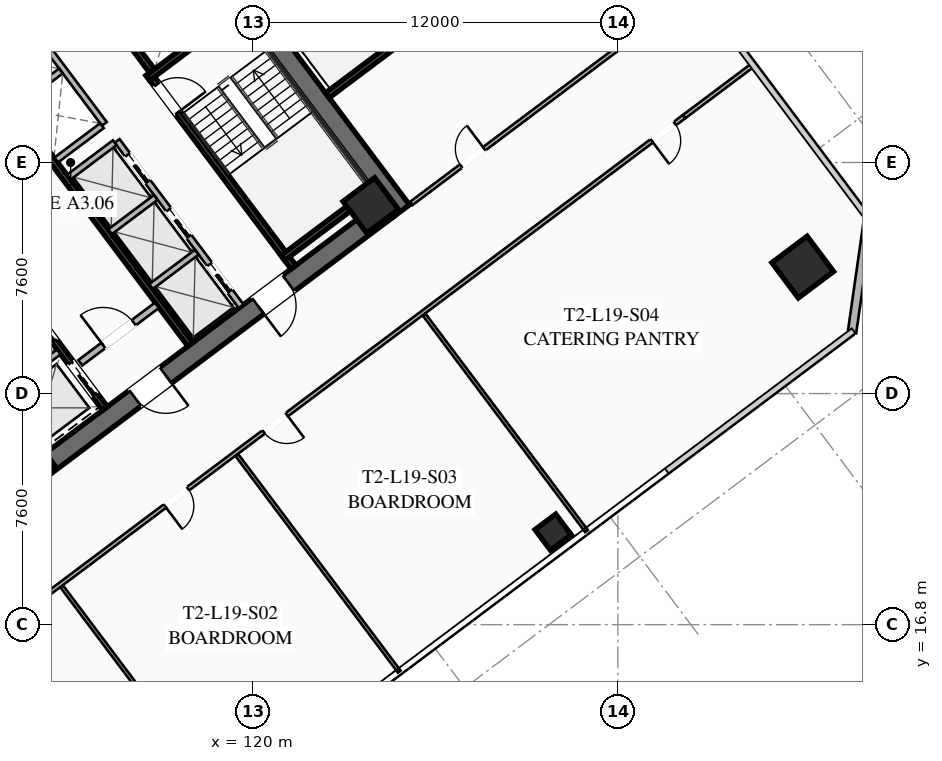
"""IFC4 building model, lengths in metres.
Left out: names, types, materials, properties, quantities, classifications, styles, units other than length and angle.
Written with IfcOpenShell. Run it as: python <this file> out.ifc"""

import sys

from ifc_helpers import new_model, si_unit, direction, frame, frame_2d, origin, origin_2d, place, context, subcontext, project, spatial, rectangle, hollow_rectangle, extrude, element, fill, save


model = new_model("IFC4")
c1 = context("Model", 3, precision=1e-05, world=origin(), true_north=direction((0.0, 1.0)))
c2 = subcontext(c1, "Body", "Model", "MODEL_VIEW")
j1 = project(units=[si_unit("LENGTHUNIT", "METRE"), si_unit("PLANEANGLEUNIT", "RADIAN")], contexts=[c1])
p1 = place(None, origin())
s1 = spatial("IfcSite", under=j1, at=p1, CompositionType="ELEMENT")
p2 = place(p1, origin())
s2 = spatial("IfcBuilding", under=s1, at=p2, CompositionType="ELEMENT")
p3 = place(p2, frame((0.0, 0.0, 74.3)))
s3 = spatial("IfcBuildingStorey", under=s2, at=p3, CompositionType="ELEMENT", Elevation=74.3)
p4 = place(p3, frame((115.524, 42.893, 0.0), z_axis=(0.0, 0.0, 1.0), x_axis=(0.600005007985, -0.799996243986, 0.0)))
e1 = element("IfcWall", 1, at=p4, inside=s3, PredefinedType="SHEAR", context=c2, shape_type="SweptSolid", body=[
    extrude(rectangle(XDim=15.6, YDim=0.65, at=frame_2d((7.8, 0.0))), origin(), (0.0, 0.0, 1.0), 3.55),
])
p5 = place(p3, frame((124.429, 30.478, 0.0), z_axis=(0.0, 0.0, 1.0), x_axis=(-0.799998028465, -0.600002628705, 0.0)))
e2 = element("IfcWall", 2, at=p5, inside=s3, PredefinedType="SHEAR", context=c2, shape_type="SweptSolid", body=[
    extrude(rectangle(XDim=14.86, YDim=0.65, at=frame_2d((7.43, 0.0))), origin(), (0.0, 0.0, 1.0), 3.55),
])
p6 = place(p5, frame((9.13, 0.0, 0.0)))
e3 = element("IfcOpeningElement", 3, at=p6, cuts=e2, PredefinedType="OPENING", context=c2, shape_type="SweptSolid", body=[
    extrude(rectangle(XDim=1.25, YDim=2.25, at=frame_2d((0.625, 1.125))), frame((0.0, 0.335, 0.0), z_axis=(0.0, -1.0, 0.0), x_axis=(1.0, 0.0, 0.0)), (0.0, 0.0, 1.0), 0.67),
])
p7 = place(p5, frame((4.08, 0.0, 0.0)))
e4 = element("IfcOpeningElement", 4, at=p7, cuts=e2, PredefinedType="OPENING", context=c2, shape_type="SweptSolid", body=[
    extrude(rectangle(XDim=1.25, YDim=2.25, at=frame_2d((0.625, 1.125))), frame((0.0, 0.335, 0.0), z_axis=(0.0, -1.0, 0.0), x_axis=(1.0, 0.0, 0.0)), (0.0, 0.0, 1.0), 0.67),
])
p8 = place(p3, frame((103.571, 33.522, 0.0), z_axis=(0.0, 0.0, 1.0), x_axis=(0.799998028465, 0.600002628705, 0.0)))
e5 = element("IfcWall", 5, at=p8, inside=s3, PredefinedType="SHEAR", context=c2, shape_type="SweptSolid", body=[
    extrude(rectangle(XDim=14.86, YDim=0.65, at=frame_2d((7.43, 0.0))), origin(), (0.0, 0.0, 1.0), 3.55),
])
p9 = place(p8, frame((4.48, 0.0, 0.0)))
e6 = element("IfcOpeningElement", 6, at=p9, cuts=e5, PredefinedType="OPENING", context=c2, shape_type="SweptSolid", body=[
    extrude(rectangle(XDim=1.25, YDim=2.25, at=frame_2d((0.625, 1.125))), frame((0.0, 0.335, 0.0), z_axis=(0.0, -1.0, 0.0), x_axis=(1.0, 0.0, 0.0)), (0.0, 0.0, 1.0), 0.67),
])
p10 = place(p8, frame((9.53, 0.0, 0.0)))
e7 = element("IfcOpeningElement", 7, at=p10, cuts=e5, PredefinedType="OPENING", context=c2, shape_type="SweptSolid", body=[
    extrude(rectangle(XDim=1.25, YDim=2.25, at=frame_2d((0.625, 1.125))), frame((0.0, 0.335, 0.0), z_axis=(0.0, -1.0, 0.0), x_axis=(1.0, 0.0, 0.0)), (0.0, 0.0, 1.0), 0.67),
])
for number, where, z_axis, x_axis in (
    (8, (112.59, 22.13, 0.0), (0.0, 0.0, 1.0), (0.8, 0.6, 0.0)),
    (9, (123.87, 30.59, 0.0), (0.0, 0.0, 1.0), (0.8, 0.6, 0.0)),
):
    element("IfcColumn", number, at=place(p3, frame(where, z_axis=z_axis, x_axis=x_axis)), inside=s3, PredefinedType="COLUMN", context=c2, shape_type="SweptSolid", body=[
        extrude(hollow_rectangle(XDim=1.3, YDim=1.3, WallThickness=0.05, at=origin_2d()), origin(), (0.0, 0.0, 1.0), 3.35),
    ])
p11 = place(p3, frame((138.08, 28.56, 0.0), z_axis=(0.0, 0.0, 1.0), x_axis=(0.799999996291, 0.600000004945, 0.0)))
e10 = element("IfcColumn", 10, at=p11, inside=s3, PredefinedType="COLUMN", context=c2, shape_type="SweptSolid", body=[
    extrude(hollow_rectangle(XDim=1.45, YDim=1.45, WallThickness=0.055, at=origin_2d()), origin(), (0.0, 0.0, 1.0), 3.35),
])
p12 = place(p3, frame((129.87, 19.84, 0.0), z_axis=(0.0, 0.0, 1.0), x_axis=(0.799999996291, 0.600000004945, 0.0)))
e11 = element("IfcColumn", 11, at=p12, inside=s3, PredefinedType="COLUMN", context=c2, shape_type="SweptSolid", body=[
    extrude(hollow_rectangle(XDim=0.85, YDim=0.85, WallThickness=0.035, at=origin_2d()), origin(), (0.0, 0.0, 1.0), 3.35),
])
p13 = place(p3, frame((140.24, 30.18, 0.0), z_axis=(0.0, 0.0, 1.0), x_axis=(-0.141430307517, -0.989948214866, 0.0)))
e12 = element("IfcWall", 12, at=p13, inside=s3, PredefinedType="SOLIDWALL", context=c2, shape_type="SweptSolid", body=[
    extrude(rectangle(XDim=3.818, YDim=0.28, at=frame_2d((1.909, 0.0))), origin(), (0.0, 0.0, 1.0), 3.35),
])
p14 = place(p3, frame((116.56, 34.92, 0.0), z_axis=(0.0, 0.0, 1.0), x_axis=(0.600009827119, -0.799992629566, 0.0)))
e13 = element("IfcWall", 13, at=p14, inside=s3, PredefinedType="SHEAR", context=c2, shape_type="SweptSolid", body=[
    extrude(rectangle(XDim=7.95, YDim=0.2, at=frame_2d((3.975, 0.0))), origin(), (0.0, 0.0, 1.0), 3.35),
])
p15 = place(p14, frame((0.45, 0.0, 0.0)))
e14 = element("IfcOpeningElement", 14, at=p15, cuts=e13, PredefinedType="OPENING", context=c2, shape_type="SweptSolid", body=[
    extrude(rectangle(XDim=1.15, YDim=2.2, at=frame_2d((0.575, 1.1))), frame((0.0, 0.11, 0.0), z_axis=(0.0, -1.0, 0.0), x_axis=(1.0, 0.0, 0.0)), (0.0, 0.0, 1.0), 0.22),
])
for number, where, z_axis, x_axis in (
    (15, (116.54, 34.78, 0.0), (0.0, 0.0, 1.0), (0.8, 0.6, 0.0)),
    (16, (120.98, 28.86, 0.0), (0.0, 0.0, 1.0), (0.8, 0.6, 0.0)),
):
    element("IfcWall", number, at=place(p3, frame(where, z_axis=z_axis, x_axis=x_axis)), inside=s3, PredefinedType="SHEAR", context=c2, shape_type="SweptSolid", body=[
        extrude(rectangle(XDim=3.73, YDim=0.2, at=frame_2d((1.865, 0.0))), origin(), (0.0, 0.0, 1.0), 3.35),
    ])
p16 = place(p3, frame((117.938, 26.016, 0.0), z_axis=(0.0, 0.0, 1.0), x_axis=(-0.600005463273, 0.799995902516, 0.0)))
e17 = element("IfcWall", 17, at=p16, inside=s3, PredefinedType="SHEAR", context=c2, shape_type="SweptSolid", body=[
    extrude(rectangle(XDim=14.3, YDim=0.2, at=frame_2d((7.15, 0.0))), origin(), (0.0, 0.0, 1.0), 3.35),
])
p17 = place(p3, frame((114.316, 25.412, 0.0), z_axis=(0.0, 0.0, 1.0), x_axis=(0.800018601094, 0.59997519774, 0.0)))
e18 = element("IfcWall", 18, at=p17, inside=s3, PredefinedType="SOLIDWALL", context=c2, shape_type="SweptSolid", body=[
    extrude(rectangle(XDim=3.15, YDim=0.22, at=frame_2d((1.575, 0.0))), origin(), (0.0, 0.0, 1.0), 2.703),
])
p18 = place(p17, frame((0.95, 0.0, 0.0)))
e19 = element("IfcOpeningElement", 19, at=p18, cuts=e18, PredefinedType="OPENING", context=c2, shape_type="SweptSolid", body=[
    extrude(rectangle(XDim=1.25, YDim=2.25, at=frame_2d((0.625, 1.125))), frame((0.0, 0.12, 0.0), z_axis=(0.0, -1.0, 0.0), x_axis=(1.0, 0.0, 0.0)), (0.0, 0.0, 1.0), 0.24),
])
p19 = place(p3, frame((115.13, 23.91, 0.0), z_axis=(0.0, 0.0, 1.0), x_axis=(-0.599975393228, 0.800018454488, 0.0)))
e20 = element("IfcWall", 20, at=p19, inside=s3, PredefinedType="SHEAR", context=c2, shape_type="SweptSolid", body=[
    extrude(rectangle(XDim=6.35, YDim=0.2, at=frame_2d((3.175, 0.0))), origin(), (0.0, 0.0, 1.0), 3.35),
])
p20 = place(p19, frame((4.775, 0.0, 0.0)))
e21 = element("IfcOpeningElement", 21, at=p20, cuts=e20, PredefinedType="OPENING", context=c2, shape_type="SweptSolid", body=[
    extrude(rectangle(XDim=1.3, YDim=2.25, at=frame_2d((0.65, 1.125))), frame((0.0, 0.11, 0.0), z_axis=(0.0, -1.0, 0.0), x_axis=(1.0, 0.0, 0.0)), (0.0, 0.0, 1.0), 0.22),
])
p21 = place(p19, frame((2.775, 0.0, 0.0)))
e22 = element("IfcOpeningElement", 22, at=p21, cuts=e20, PredefinedType="OPENING", context=c2, shape_type="SweptSolid", body=[
    extrude(rectangle(XDim=1.3, YDim=2.25, at=frame_2d((0.65, 1.125))), frame((0.0, 0.11, 0.0), z_axis=(0.0, -1.0, 0.0), x_axis=(1.0, 0.0, 0.0)), (0.0, 0.0, 1.0), 0.22),
])
p22 = place(p19, frame((0.575, 0.0, 0.0)))
e23 = element("IfcOpeningElement", 23, at=p22, cuts=e20, PredefinedType="OPENING", context=c2, shape_type="SweptSolid", body=[
    extrude(rectangle(XDim=1.3, YDim=2.25, at=frame_2d((0.65, 1.125))), frame((0.0, 0.11, 0.0), z_axis=(0.0, -1.0, 0.0), x_axis=(1.0, 0.0, 0.0)), (0.0, 0.0, 1.0), 0.22),
])
p23 = place(p3, frame((110.906, 23.742, 0.0), z_axis=(0.0, 0.0, 1.0), x_axis=(0.8, 0.6, 0.0)))
e24 = element("IfcWall", 24, at=p23, inside=s3, PredefinedType="SOLIDWALL", context=c2, shape_type="SweptSolid", body=[
    extrude(rectangle(XDim=3.38, YDim=0.2, at=frame_2d((1.69, 0.0))), origin(), (0.0, 0.0, 1.0), 3.35),
])
p24 = place(p3, frame((112.87, 40.09, 0.0), z_axis=(0.0, 0.0, 1.0), x_axis=(0.599975393228, -0.800018454488, 0.0)))
e25 = element("IfcWall", 25, at=p24, inside=s3, PredefinedType="SHEAR", context=c2, shape_type="SweptSolid", body=[
    extrude(rectangle(XDim=6.35, YDim=0.2, at=frame_2d((3.175, 0.0))), origin(), (0.0, 0.0, 1.0), 3.35),
])
p25 = place(p3, frame((119.61, 27.27, 0.0), z_axis=(0.0, 0.0, 1.0), x_axis=(-0.600011488909, 0.79999138319, 0.0)))
e26 = element("IfcWall", 26, at=p25, inside=s3, PredefinedType="SOLIDWALL", context=c2, shape_type="SweptSolid", body=[
    extrude(rectangle(XDim=6.8, YDim=0.2, at=frame_2d((3.4, 0.0))), origin(), (0.0, 0.0, 1.0), 3.35),
])
p26 = place(p25, frame((0.625, 0.0, 0.0)))
e27 = element("IfcOpeningElement", 27, at=p26, cuts=e26, PredefinedType="OPENING", context=c2, shape_type="SweptSolid", body=[
    extrude(rectangle(XDim=1.1, YDim=2.2, at=frame_2d((0.55, 1.1))), frame((0.0, 0.11, 0.0), z_axis=(0.0, -1.0, 0.0), x_axis=(1.0, 0.0, 0.0)), (0.0, 0.0, 1.0), 0.22),
])
p27 = place(p25, frame((2.875, 0.0, 0.0)))
e28 = element("IfcOpeningElement", 28, at=p27, cuts=e26, PredefinedType="OPENING", context=c2, shape_type="SweptSolid", body=[
    extrude(rectangle(XDim=1.1, YDim=2.2, at=frame_2d((0.55, 1.1))), frame((0.0, 0.11, 0.0), z_axis=(0.0, -1.0, 0.0), x_axis=(1.0, 0.0, 0.0)), (0.0, 0.0, 1.0), 0.22),
])
p28 = place(p25, frame((5.125, 0.0, 0.0)))
e29 = element("IfcOpeningElement", 29, at=p28, cuts=e26, PredefinedType="OPENING", context=c2, shape_type="SweptSolid", body=[
    extrude(rectangle(XDim=1.1, YDim=2.2, at=frame_2d((0.55, 1.1))), frame((0.0, 0.11, 0.0), z_axis=(0.0, -1.0, 0.0), x_axis=(1.0, 0.0, 0.0)), (0.0, 0.0, 1.0), 0.22),
])
p29 = place(p3, frame((116.646, 27.922, 0.0), z_axis=(0.0, 0.0, 1.0), x_axis=(0.8, 0.6, 0.0)))
e30 = element("IfcWall", 30, at=p29, inside=s3, PredefinedType="SOLIDWALL", context=c2, shape_type="SweptSolid", body=[
    extrude(rectangle(XDim=1.88, YDim=0.2, at=frame_2d((0.94, 0.0))), origin(), (0.0, 0.0, 1.0), 3.35),
])
p30 = place(p3, frame((115.296, 29.722, 0.0), z_axis=(0.0, 0.0, 1.0), x_axis=(0.799984418148, 0.600020775241, 0.0)))
e31 = element("IfcWall", 31, at=p30, inside=s3, PredefinedType="SOLIDWALL", context=c2, shape_type="SweptSolid", body=[
    extrude(rectangle(XDim=1.88, YDim=0.2, at=frame_2d((0.94, 0.0))), origin(), (0.0, 0.0, 1.0), 3.35),
])
p31 = place(p3, frame((113.946, 31.522, 0.0), z_axis=(0.0, 0.0, 1.0), x_axis=(0.8, 0.6, 0.0)))
e32 = element("IfcWall", 32, at=p31, inside=s3, PredefinedType="SOLIDWALL", context=c2, shape_type="SweptSolid", body=[
    extrude(rectangle(XDim=1.88, YDim=0.2, at=frame_2d((0.94, 0.0))), origin(), (0.0, 0.0, 1.0), 3.35),
])
p32 = place(p3, frame((115.11, 33.27, 0.0), z_axis=(0.0, 0.0, 1.0), x_axis=(-0.600011488909, 0.79999138319, 0.0)))
e33 = element("IfcWall", 33, at=p32, inside=s3, PredefinedType="SOLIDWALL", context=c2, shape_type="SweptSolid", body=[
    extrude(rectangle(XDim=6.8, YDim=0.2, at=frame_2d((3.4, 0.0))), origin(), (0.0, 0.0, 1.0), 3.35),
])
p33 = place(p3, frame((113.526, 32.082, 0.0), z_axis=(0.0, 0.0, 1.0), x_axis=(0.800046745961, 0.599937666993, 0.0)))
e34 = element("IfcWall", 34, at=p33, inside=s3, PredefinedType="SOLIDWALL", context=c2, shape_type="SweptSolid", body=[
    extrude(rectangle(XDim=1.88, YDim=0.2, at=frame_2d((0.94, 0.0))), origin(), (0.0, 0.0, 1.0), 3.35),
])
p34 = place(p3, frame((112.176, 33.882, 0.0), z_axis=(0.0, 0.0, 1.0), x_axis=(0.8, 0.6, 0.0)))
e35 = element("IfcWall", 35, at=p34, inside=s3, PredefinedType="SOLIDWALL", context=c2, shape_type="SweptSolid", body=[
    extrude(rectangle(XDim=1.88, YDim=0.2, at=frame_2d((0.94, 0.0))), origin(), (0.0, 0.0, 1.0), 3.35),
])
p35 = place(p3, frame((122.444, 34.208, 0.0), z_axis=(0.0, 0.0, 1.0), x_axis=(0.79999138319, 0.600011488909, 0.0)))
e36 = element("IfcWall", 36, at=p35, inside=s3, PredefinedType="SHEAR", context=c2, shape_type="SweptSolid", body=[
    extrude(rectangle(XDim=3.4, YDim=0.2, at=frame_2d((1.7, 0.0))), origin(), (0.0, 0.0, 1.0), 3.35),
])
p36 = place(p3, frame((98.516, 34.012, 0.0), z_axis=(0.0, 0.0, 1.0), x_axis=(0.8, 0.6, 0.0)))
e37 = element("IfcWall", 37, at=p36, inside=s3, PredefinedType="PARTITIONING", context=c2, shape_type="SweptSolid", body=[
    extrude(rectangle(XDim=28.23, YDim=0.135, at=frame_2d((14.115, 0.0))), origin(), (0.0, 0.0, 1.0), 2.703),
])
p37 = place(p36, frame((0.3, 0.0, 0.0)))
e38 = element("IfcOpeningElement", 38, at=p37, cuts=e37, PredefinedType="OPENING", context=c2, shape_type="SweptSolid", body=[
    extrude(rectangle(XDim=0.95, YDim=2.05, at=frame_2d((0.475, 1.025))), frame((0.0, 0.077, 0.0), z_axis=(0.0, -1.0, 0.0), x_axis=(1.0, 0.0, 0.0)), (0.0, 0.0, 1.0), 0.155),
])
p38 = place(p36, frame((6.84, 0.0, 0.0)))
e39 = element("IfcOpeningElement", 39, at=p38, cuts=e37, PredefinedType="OPENING", context=c2, shape_type="SweptSolid", body=[
    extrude(rectangle(XDim=0.95, YDim=2.05, at=frame_2d((0.475, 1.025))), frame((0.0, 0.077, 0.0), z_axis=(0.0, -1.0, 0.0), x_axis=(1.0, 0.0, 0.0)), (0.0, 0.0, 1.0), 0.155),
])
p39 = place(p36, frame((10.863, 0.0, 0.0)))
e40 = element("IfcOpeningElement", 40, at=p39, cuts=e37, PredefinedType="OPENING", context=c2, shape_type="SweptSolid", body=[
    extrude(rectangle(XDim=0.95, YDim=2.05, at=frame_2d((0.475, 1.025))), frame((0.0, 0.077, 0.0), z_axis=(0.0, -1.0, 0.0), x_axis=(1.0, 0.0, 0.0)), (0.0, 0.0, 1.0), 0.155),
])
p40 = place(p36, frame((26.98, 0.0, 0.0)))
e41 = element("IfcOpeningElement", 41, at=p40, cuts=e37, PredefinedType="OPENING", context=c2, shape_type="SweptSolid", body=[
    extrude(rectangle(XDim=0.95, YDim=2.05, at=frame_2d((0.475, 1.025))), frame((0.0, 0.077, 0.0), z_axis=(0.0, -1.0, 0.0), x_axis=(1.0, 0.0, 0.0)), (0.0, 0.0, 1.0), 0.155),
])
p41 = place(p3, frame((134.18, 33.51, 0.0), z_axis=(0.0, 0.0, 1.0), x_axis=(-0.8, -0.6, 0.0)))
e42 = element("IfcWall", 42, at=p41, inside=s3, PredefinedType="PARTITIONING", context=c2, shape_type="SweptSolid", body=[
    extrude(rectangle(XDim=28.23, YDim=0.135, at=frame_2d((14.115, 0.0))), origin(), (0.0, 0.0, 1.0), 2.703),
])
p42 = place(p41, frame((26.9, 0.0, 0.0)))
e43 = element("IfcOpeningElement", 43, at=p42, cuts=e42, PredefinedType="OPENING", context=c2, shape_type="SweptSolid", body=[
    extrude(rectangle(XDim=0.95, YDim=2.05, at=frame_2d((0.475, 1.025))), frame((0.0, 0.077, 0.0), z_axis=(0.0, -1.0, 0.0), x_axis=(1.0, 0.0, 0.0)), (0.0, 0.0, 1.0), 0.155),
])
p43 = place(p41, frame((20.399, 0.0, 0.0)))
e44 = element("IfcOpeningElement", 44, at=p43, cuts=e42, PredefinedType="OPENING", context=c2, shape_type="SweptSolid", body=[
    extrude(rectangle(XDim=0.95, YDim=2.05, at=frame_2d((0.475, 1.025))), frame((0.0, 0.077, 0.0), z_axis=(0.0, -1.0, 0.0), x_axis=(1.0, 0.0, 0.0)), (0.0, 0.0, 1.0), 0.155),
])
p44 = place(p41, frame((16.339, 0.0, 0.0)))
e45 = element("IfcOpeningElement", 45, at=p44, cuts=e42, PredefinedType="OPENING", context=c2, shape_type="SweptSolid", body=[
    extrude(rectangle(XDim=0.95, YDim=2.05, at=frame_2d((0.475, 1.025))), frame((0.0, 0.077, 0.0), z_axis=(0.0, -1.0, 0.0), x_axis=(1.0, 0.0, 0.0)), (0.0, 0.0, 1.0), 0.155),
])
p45 = place(p41, frame((0.38, 0.0, 0.0)))
e46 = element("IfcOpeningElement", 46, at=p45, cuts=e42, PredefinedType="OPENING", context=c2, shape_type="SweptSolid", body=[
    extrude(rectangle(XDim=0.95, YDim=2.05, at=frame_2d((0.475, 1.025))), frame((0.0, 0.077, 0.0), z_axis=(0.0, -1.0, 0.0), x_axis=(1.0, 0.0, 0.0)), (0.0, 0.0, 1.0), 0.155),
])
p46 = place(p3, frame((134.18, 33.51, 0.0), z_axis=(0.0, 0.0, 1.0), x_axis=(0.8000207031, 0.599972394874, 0.0)))
e47 = element("IfcWall", 47, at=p46, inside=s3, PredefinedType="PARTITIONING", context=c2, shape_type="SweptSolid", body=[
    extrude(rectangle(XDim=2.83, YDim=0.135, at=frame_2d((1.415, 0.0))), origin(), (0.0, 0.0, 1.0), 2.703),
])
for number, where, z_axis, x_axis in (
    (48, (119.048, 10.936, 0.0), (0.0, 0.0, 1.0), (-0.6, 0.8, 0.0)),
    (49, (124.808, 15.256, 0.0), (0.0, 0.0, 1.0), (-0.6, 0.8, 0.0)),
):
    element("IfcWall", number, at=place(p3, frame(where, z_axis=z_axis, x_axis=x_axis)), inside=s3, PredefinedType="PARTITIONING", context=c2, shape_type="SweptSolid", body=[
        extrude(rectangle(XDim=8.9, YDim=0.11, at=frame_2d((4.45, 0.0))), origin(), (0.0, 0.0, 1.0), 2.703),
    ])
p47 = place(p3, frame((130.968, 19.876, 0.0), z_axis=(0.0, 0.0, 1.0), x_axis=(-0.6, 0.8, 0.0)))
e50 = element("IfcWall", 50, at=p47, inside=s3, PredefinedType="PARTITIONING", context=c2, shape_type="SweptSolid", body=[
    extrude(rectangle(XDim=8.9, YDim=0.11, at=frame_2d((4.45, 0.0))), origin(), (0.0, 0.0, 1.0), 2.703),
])
p48 = place(p3, frame((125.208, 30.656, 0.0), z_axis=(0.0, 0.0, 1.0), x_axis=(0.8, 0.6, 0.0)))
e51 = element("IfcWall", 51, at=p48, inside=s3, PredefinedType="PARTITIONING", context=c2, shape_type="SweptSolid", body=[
    extrude(rectangle(XDim=11.72, YDim=0.135, at=frame_2d((5.86, 0.0))), origin(), (0.0, 0.0, 1.0), 2.703),
])
p49 = place(p48, frame((2.045, 0.0, 0.0)))
e52 = element("IfcOpeningElement", 52, at=p49, cuts=e51, PredefinedType="OPENING", context=c2, shape_type="SweptSolid", body=[
    extrude(rectangle(XDim=0.95, YDim=2.05, at=frame_2d((0.475, 1.025))), frame((0.0, 0.077, 0.0), z_axis=(0.0, -1.0, 0.0), x_axis=(1.0, 0.0, 0.0)), (0.0, 0.0, 1.0), 0.155),
])
p50 = place(p6, origin())
e53 = element("IfcDoor", 53, at=p50, inside=s3, OperationType="SINGLE_SWING_LEFT", PredefinedType="DOOR", context=c2, shape_type="SweptSolid", body=[
    extrude(rectangle(XDim=1.25, YDim=2.25, at=frame_2d((0.625, 1.125))), frame((0.0, 0.025, 0.0), z_axis=(0.0, -1.0, 0.0), x_axis=(1.0, 0.0, 0.0)), (0.0, 0.0, 1.0), 0.05),
])
fill(e3, e53)
p51 = place(p7, origin())
e54 = element("IfcDoor", 54, at=p51, inside=s3, OperationType="SINGLE_SWING_RIGHT", PredefinedType="DOOR", context=c2, shape_type="SweptSolid", body=[
    extrude(rectangle(XDim=1.25, YDim=2.25, at=frame_2d((0.625, 1.125))), frame((0.0, 0.025, 0.0), z_axis=(0.0, -1.0, 0.0), x_axis=(1.0, 0.0, 0.0)), (0.0, 0.0, 1.0), 0.05),
])
fill(e4, e54)
p52 = place(p15, origin())
e55 = element("IfcDoor", 55, at=p52, inside=s3, OperationType="SINGLE_SWING_RIGHT", PredefinedType="DOOR", context=c2, shape_type="SweptSolid", body=[
    extrude(rectangle(XDim=1.15, YDim=2.2, at=frame_2d((0.575, 1.1))), frame((0.0, 0.025, 0.0), z_axis=(0.0, -1.0, 0.0), x_axis=(1.0, 0.0, 0.0)), (0.0, 0.0, 1.0), 0.05),
])
fill(e14, e55)
p53 = place(p18, origin())
e56 = element("IfcDoor", 56, at=p53, inside=s3, OperationType="SINGLE_SWING_LEFT", PredefinedType="DOOR", context=c2, shape_type="SweptSolid", body=[
    extrude(rectangle(XDim=1.25, YDim=2.25, at=frame_2d((0.625, 1.125))), frame((0.0, 0.025, 0.0), z_axis=(0.0, -1.0, 0.0), x_axis=(1.0, 0.0, 0.0)), (0.0, 0.0, 1.0), 0.05),
])
fill(e19, e56)
p54 = place(p43, origin())
e57 = element("IfcDoor", 57, at=p54, inside=s3, OperationType="SINGLE_SWING_RIGHT", PredefinedType="DOOR", context=c2, shape_type="SweptSolid", body=[
    extrude(rectangle(XDim=0.95, YDim=2.05, at=frame_2d((0.475, 1.025))), frame((0.0, 0.025, 0.0), z_axis=(0.0, -1.0, 0.0), x_axis=(1.0, 0.0, 0.0)), (0.0, 0.0, 1.0), 0.05),
])
fill(e44, e57)
p55 = place(p44, origin())
e58 = element("IfcDoor", 58, at=p55, inside=s3, OperationType="SINGLE_SWING_LEFT", PredefinedType="DOOR", context=c2, shape_type="SweptSolid", body=[
    extrude(rectangle(XDim=0.95, YDim=2.05, at=frame_2d((0.475, 1.025))), frame((0.0, 0.025, 0.0), z_axis=(0.0, -1.0, 0.0), x_axis=(1.0, 0.0, 0.0)), (0.0, 0.0, 1.0), 0.05),
])
fill(e45, e58)
p56 = place(p45, origin())
e59 = element("IfcDoor", 59, at=p56, inside=s3, OperationType="SINGLE_SWING_RIGHT", PredefinedType="DOOR", context=c2, shape_type="SweptSolid", body=[
    extrude(rectangle(XDim=0.95, YDim=2.05, at=frame_2d((0.475, 1.025))), frame((0.0, 0.025, 0.0), z_axis=(0.0, -1.0, 0.0), x_axis=(1.0, 0.0, 0.0)), (0.0, 0.0, 1.0), 0.05),
])
fill(e46, e59)
p57 = place(p49, origin())
e60 = element("IfcDoor", 60, at=p57, inside=s3, OperationType="SINGLE_SWING_RIGHT", PredefinedType="DOOR", context=c2, shape_type="SweptSolid", body=[
    extrude(rectangle(XDim=0.95, YDim=2.05, at=frame_2d((0.475, 1.025))), frame((0.0, 0.025, 0.0), z_axis=(0.0, -1.0, 0.0), x_axis=(1.0, 0.0, 0.0)), (0.0, 0.0, 1.0), 0.05),
])
fill(e52, e60)
p58 = place(p21, origin())
e61 = element("IfcDoor", 61, at=p58, inside=s3, OperationType="SLIDING_TO_LEFT", PredefinedType="DOOR", context=c2, shape_type="SweptSolid", body=[
    extrude(rectangle(XDim=1.3, YDim=2.25, at=frame_2d((0.65, 1.125))), frame((0.0, 0.025, 0.0), z_axis=(0.0, -1.0, 0.0), x_axis=(1.0, 0.0, 0.0)), (0.0, 0.0, 1.0), 0.05),
])
fill(e22, e61)
p59 = place(p22, origin())
e62 = element("IfcDoor", 62, at=p59, inside=s3, OperationType="SLIDING_TO_LEFT", PredefinedType="DOOR", context=c2, shape_type="SweptSolid", body=[
    extrude(rectangle(XDim=1.3, YDim=2.25, at=frame_2d((0.65, 1.125))), frame((0.0, 0.025, 0.0), z_axis=(0.0, -1.0, 0.0), x_axis=(1.0, 0.0, 0.0)), (0.0, 0.0, 1.0), 0.05),
])
fill(e23, e62)
p60 = place(p26, origin())
e63 = element("IfcDoor", 63, at=p60, inside=s3, OperationType="SLIDING_TO_LEFT", PredefinedType="DOOR", context=c2, shape_type="SweptSolid", body=[
    extrude(rectangle(XDim=1.1, YDim=2.2, at=frame_2d((0.55, 1.1))), frame((0.0, 0.025, 0.0), z_axis=(0.0, -1.0, 0.0), x_axis=(1.0, 0.0, 0.0)), (0.0, 0.0, 1.0), 0.05),
])
fill(e27, e63)
p61 = place(p27, origin())
e64 = element("IfcDoor", 64, at=p61, inside=s3, OperationType="SLIDING_TO_LEFT", PredefinedType="DOOR", context=c2, shape_type="SweptSolid", body=[
    extrude(rectangle(XDim=1.1, YDim=2.2, at=frame_2d((0.55, 1.1))), frame((0.0, 0.025, 0.0), z_axis=(0.0, -1.0, 0.0), x_axis=(1.0, 0.0, 0.0)), (0.0, 0.0, 1.0), 0.05),
])
fill(e28, e64)
p62 = place(p28, origin())
e65 = element("IfcDoor", 65, at=p62, inside=s3, OperationType="SLIDING_TO_LEFT", PredefinedType="DOOR", context=c2, shape_type="SweptSolid", body=[
    extrude(rectangle(XDim=1.1, YDim=2.2, at=frame_2d((0.55, 1.1))), frame((0.0, 0.025, 0.0), z_axis=(0.0, -1.0, 0.0), x_axis=(1.0, 0.0, 0.0)), (0.0, 0.0, 1.0), 0.05),
])
fill(e29, e65)
save(model, sys.argv[1])
